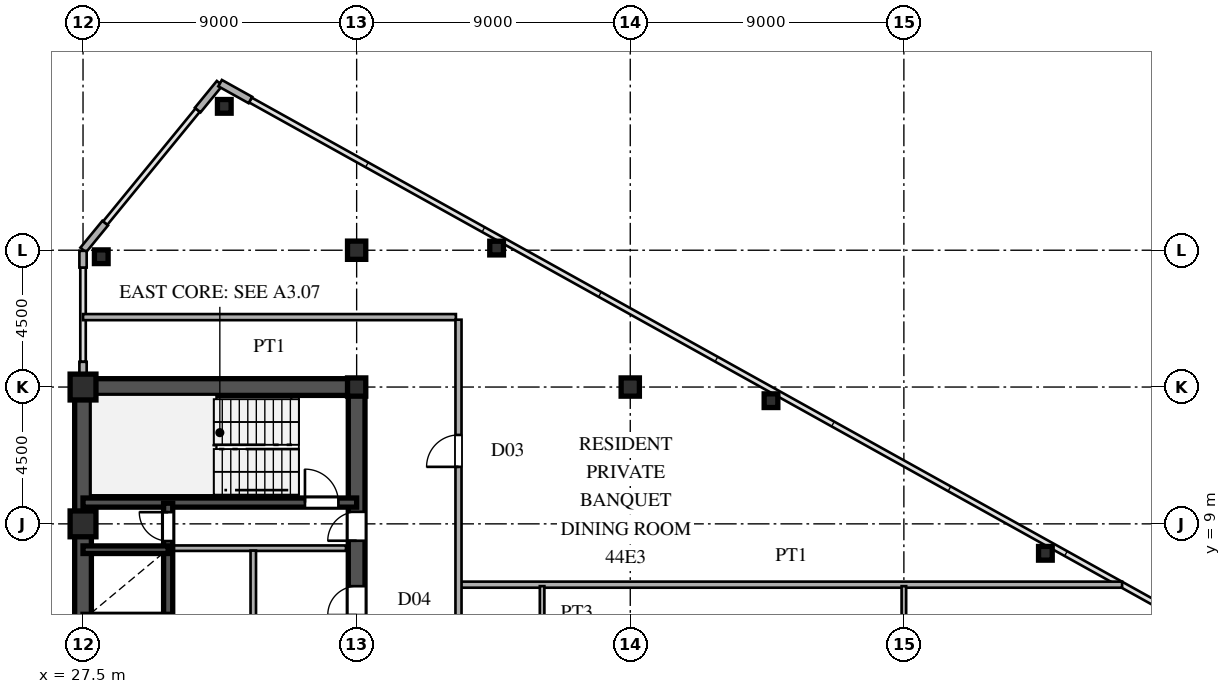
"""IFC4 building model, lengths in metres.
Left out: names, types, materials, properties, quantities, classifications, styles, units other than length and angle.
Written with IfcOpenShell. Run it as: python <this file> out.ifc"""

import sys

from ifc_helpers import new_model, si_unit, direction, frame, frame_2d, origin, origin_2d, place, context, subcontext, project, spatial, rectangle, hollow_rectangle, i_section, extrude, source, transform, mapped, element, fill, save


model = new_model("IFC4")
c1 = context("Model", 3, precision=1e-05, world=origin(), true_north=direction((0.0, 1.0)))
c2 = subcontext(c1, "Body", "Model", "MODEL_VIEW")
j1 = project(units=[si_unit("LENGTHUNIT", "METRE"), si_unit("PLANEANGLEUNIT", "RADIAN")], contexts=[c1])
p1 = place(None, origin())
s1 = spatial("IfcSite", under=j1, at=p1, CompositionType="ELEMENT")
p2 = place(p1, origin())
s2 = spatial("IfcBuilding", under=s1, at=p2, CompositionType="ELEMENT")
p3 = place(p2, frame((0.0, 0.0, 167.1)))
s3 = spatial("IfcBuildingStorey", under=s2, at=p3, CompositionType="ELEMENT", Elevation=167.1)
m1 = source(origin(), c2, "Body", "SweptSolid", [
    extrude(hollow_rectangle(XDim=0.85, YDim=0.85, WallThickness=0.036, at=origin_2d()), origin(), (0.0, 0.0, 1.0), 3.6),
])
for number, where, z_axis, x_axis in (
    (1, (27.5, 9.0, 0.0), (0.0, 0.0, 1.0), (1.0, 0.0, 0.0)),
    (2, (27.5, 13.5, 0.0), (0.0, 0.0, 1.0), (1.0, 0.0, 0.0)),
):
    element("IfcColumn", number, at=place(p3, frame(where, z_axis=z_axis, x_axis=x_axis)), inside=s3, PredefinedType="COLUMN", context=c2, shape_type="MappedRepresentation", body=[
        mapped(m1, transform((0.0, 0.0, 0.0), scale=1.0)),
    ])
m2 = source(origin(), c2, "Body", "SweptSolid", [
    extrude(i_section(OverallWidth=0.6, OverallDepth=0.6, WebThickness=0.025, FlangeThickness=0.04, at=origin_2d()), origin(), (0.0, 0.0, 1.0), 3.6),
])
for number, where, z_axis, x_axis in (
    (3, (36.5, 13.5, 0.0), (0.0, 0.0, 1.0), (1.0, 0.0, 0.0)),
    (4, (36.5, 18.0, 0.0), (0.0, 0.0, 1.0), (1.0, 0.0, 0.0)),
    (5, (45.5, 13.5, 0.0), (0.0, 0.0, 1.0), (1.0, 0.0, 0.0)),
):
    element("IfcColumn", number, at=place(p3, frame(where, z_axis=z_axis, x_axis=x_axis)), inside=s3, PredefinedType="COLUMN", context=c2, shape_type="MappedRepresentation", body=[
        mapped(m2, transform((0.0, 0.0, 0.0), scale=1.0)),
    ])
m3 = source(origin(), c2, "Body", "SweptSolid", [
    extrude(hollow_rectangle(XDim=0.45, YDim=0.45, WallThickness=0.018, at=origin_2d()), origin(), (0.0, 0.0, 1.0), 3.6),
])
for number, where, z_axis, x_axis in (
    (6, (32.147, 22.732, 0.0), (0.0, 0.0, 1.0), (1.0, 0.0, 0.0)),
    (7, (28.1, 17.786, 0.0), (0.0, 0.0, 1.0), (1.0, 0.0, 0.0)),
    (8, (41.104, 18.071, 0.0), (0.0, 0.0, 1.0), (1.0, 0.0, 0.0)),
    (9, (50.129, 13.051, 0.0), (0.0, 0.0, 1.0), (1.0, 0.0, 0.0)),
    (10, (59.155, 8.031, 0.0), (0.0, 0.0, 1.0), (1.0, 0.0, 0.0)),
):
    element("IfcColumn", number, at=place(p3, frame(where, z_axis=z_axis, x_axis=x_axis)), inside=s3, PredefinedType="COLUMN", context=c2, shape_type="MappedRepresentation", body=[
        mapped(m3, transform((0.0, 0.0, 0.0), scale=1.0)),
    ])
p4 = place(p3, frame((33.005, 22.941, 0.0), z_axis=(0.0, 0.0, 1.0), x_axis=(-0.87385402111, 0.486188389196, 0.0)))
e11 = element("IfcWall", 11, at=p4, inside=s3, PredefinedType="SOLIDWALL", context=c2, shape_type="SweptSolid", body=[
    extrude(rectangle(XDim=1.14, YDim=0.24, at=frame_2d((0.57, 0.0))), origin(), (0.0, 0.0, 1.0), 3.38),
])
for number, where, z_axis, x_axis in (
    (12, (31.994, 23.492, 0.0), (0.0, 0.0, 1.0), (-0.633, -0.774, 0.0)),
    (13, (28.228, 18.89, 0.0), (0.0, 0.0, 1.0), (-0.633, -0.774, 0.0)),
):
    element("IfcWall", number, at=place(p3, frame(where, z_axis=z_axis, x_axis=x_axis)), inside=s3, PredefinedType="SOLIDWALL", context=c2, shape_type="SweptSolid", body=[
        extrude(rectangle(XDim=1.14, YDim=0.24, at=frame_2d((0.57, 0.0))), origin(), (0.0, 0.0, 1.0), 3.38),
    ])
p5 = place(p3, frame((27.5, 13.78, 0.0), z_axis=(0.0, 0.0, 1.0), x_axis=(0.0, 1.0, 0.0)))
e14 = element("IfcWall", 14, at=p5, inside=s3, PredefinedType="SOLIDWALL", context=c2, shape_type="SweptSolid", body=[
    extrude(rectangle(XDim=0.55, YDim=0.24, at=frame_2d((0.275, 0.0))), origin(), (0.0, 0.0, 1.0), 2.88),
])
p6 = place(p3, frame((27.5, 17.43, 0.0), z_axis=(0.0, 0.0, 1.0), x_axis=(0.0, 1.0, 0.0)))
e15 = element("IfcWall", 15, at=p6, inside=s3, PredefinedType="SOLIDWALL", context=c2, shape_type="SweptSolid", body=[
    extrude(rectangle(XDim=0.55, YDim=0.24, at=frame_2d((0.275, 0.0))), origin(), (0.0, 0.0, 1.0), 3.38),
])
p7 = place(p3, frame((27.5, 1.3, 0.0), z_axis=(0.0, 0.0, 1.0), x_axis=(0.0, 1.0, 0.0)))
e16 = element("IfcWall", 16, at=p7, inside=s3, PredefinedType="SHEAR", context=c2, shape_type="SweptSolid", body=[
    extrude(rectangle(XDim=12.2, YDim=0.55, at=frame_2d((6.1, 0.0))), origin(), (0.0, 0.0, 1.0), 3.38),
])
p8 = place(p3, frame((27.5, 13.5, 0.0), z_axis=(0.0, 0.0, 1.0), x_axis=(1.0, 0.0, 0.0)))
e17 = element("IfcWall", 17, at=p8, inside=s3, PredefinedType="SHEAR", context=c2, shape_type="SweptSolid", body=[
    extrude(rectangle(XDim=9.0, YDim=0.55, at=frame_2d((4.5, 0.0))), origin(), (0.0, 0.0, 1.0), 3.38),
])
p9 = place(p3, frame((36.5, 8.2, 0.0), z_axis=(0.0, 0.0, 1.0), x_axis=(0.0, 1.0, 0.0)))
e18 = element("IfcWall", 18, at=p9, inside=s3, PredefinedType="SHEAR", context=c2, shape_type="SweptSolid", body=[
    extrude(rectangle(XDim=5.45, YDim=0.55, at=frame_2d((2.725, 0.0))), origin(), (0.0, 0.0, 1.0), 3.38),
])
p10 = place(p9, frame((0.245, 0.0, 0.0)))
e19 = element("IfcOpeningElement", 19, at=p10, cuts=e18, PredefinedType="OPENING", context=c2, shape_type="SweptSolid", body=[
    extrude(rectangle(XDim=0.95, YDim=2.15, at=frame_2d((0.475, 1.075))), frame((0.0, 0.285, 0.0), z_axis=(0.0, -1.0, 0.0), x_axis=(1.0, 0.0, 0.0)), (0.0, 0.0, 1.0), 0.57),
])
p11 = place(p3, frame((36.5, 4.75, 0.0), z_axis=(0.0, 0.0, 1.0), x_axis=(0.0, 1.0, 0.0)))
e20 = element("IfcWall", 20, at=p11, inside=s3, PredefinedType="SHEAR", context=c2, shape_type="SweptSolid", body=[
    extrude(rectangle(XDim=3.45, YDim=0.55, at=frame_2d((1.725, 0.0))), origin(), (0.0, 0.0, 1.0), 3.38),
])
p12 = place(p11, frame((1.25, 0.0, 0.0)))
e21 = element("IfcOpeningElement", 21, at=p12, cuts=e20, PredefinedType="OPENING", context=c2, shape_type="SweptSolid", body=[
    extrude(rectangle(XDim=0.95, YDim=2.15, at=frame_2d((0.475, 1.075))), frame((0.0, 0.285, 0.0), z_axis=(0.0, -1.0, 0.0), x_axis=(1.0, 0.0, 0.0)), (0.0, 0.0, 1.0), 0.57),
])
p13 = place(p3, frame((27.5, 9.7, 0.0), z_axis=(0.0, 0.0, 1.0), x_axis=(1.0, 0.0, 0.0)))
e22 = element("IfcWall", 22, at=p13, inside=s3, PredefinedType="SHEAR", context=c2, shape_type="SweptSolid", body=[
    extrude(rectangle(XDim=9.0, YDim=0.3, at=frame_2d((4.5, 0.0))), origin(), (0.0, 0.0, 1.0), 3.38),
])
p14 = place(p13, frame((7.3, 0.0, 0.0)))
e23 = element("IfcOpeningElement", 23, at=p14, cuts=e22, PredefinedType="OPENING", context=c2, shape_type="SweptSolid", body=[
    extrude(rectangle(XDim=1.1, YDim=2.2, at=frame_2d((0.55, 1.1))), frame((0.0, 0.16, 0.0), z_axis=(0.0, -1.0, 0.0), x_axis=(1.0, 0.0, 0.0)), (0.0, 0.0, 1.0), 0.32),
])
for number, where, z_axis, x_axis in (
    (24, (27.5, 5.9, 0.0), (0.0, 0.0, 1.0), (1.0, 0.0, 0.0)),
    (25, (27.5, 8.15, 0.0), (0.0, 0.0, 1.0), (1.0, 0.0, 0.0)),
):
    element("IfcWall", number, at=place(p3, frame(where, z_axis=z_axis, x_axis=x_axis)), inside=s3, PredefinedType="SHEAR", context=c2, shape_type="SweptSolid", body=[
        extrude(rectangle(XDim=2.8, YDim=0.25, at=frame_2d((1.4, 0.0))), origin(), (0.0, 0.0, 1.0), 3.38),
    ])
p15 = place(p3, frame((30.3, 5.9, 0.0), z_axis=(0.0, 0.0, 1.0), x_axis=(0.0, 1.0, 0.0)))
e26 = element("IfcWall", 26, at=p15, inside=s3, PredefinedType="SHEAR", context=c2, shape_type="SweptSolid", body=[
    extrude(rectangle(XDim=2.25, YDim=0.3, at=frame_2d((1.125, 0.0))), origin(), (0.0, 0.0, 1.0), 3.38),
])
p16 = place(p3, frame((30.3, 8.15, 0.0), z_axis=(0.0, 0.0, 1.0), x_axis=(0.0, 1.0, 0.0)))
e27 = element("IfcWall", 27, at=p16, inside=s3, PredefinedType="SHEAR", context=c2, shape_type="SweptSolid", body=[
    extrude(rectangle(XDim=1.53, YDim=0.3, at=frame_2d((0.765, 0.0))), origin(), (0.0, 0.0, 1.0), 3.38),
])
p17 = place(p16, frame((0.285, 0.0, 0.0)))
e28 = element("IfcOpeningElement", 28, at=p17, cuts=e27, PredefinedType="OPENING", context=c2, shape_type="SweptSolid", body=[
    extrude(rectangle(XDim=0.95, YDim=2.15, at=frame_2d((0.475, 1.075))), frame((0.0, 0.16, 0.0), z_axis=(0.0, -1.0, 0.0), x_axis=(1.0, 0.0, 0.0)), (0.0, 0.0, 1.0), 0.32),
])
p18 = place(p3, frame((30.45, 8.2, 0.0), z_axis=(0.0, 0.0, 1.0), x_axis=(1.0, 0.0, 0.0)))
e29 = element("IfcWall", 29, at=p18, inside=s3, PredefinedType="PARTITIONING", context=c2, shape_type="SweptSolid", body=[
    extrude(rectangle(XDim=5.7, YDim=0.18, at=frame_2d((2.85, 0.0))), origin(), (0.0, 0.0, 1.0), 3.38),
])
p19 = place(p3, frame((33.1, 1.38, 0.0), z_axis=(0.0, 0.0, 1.0), x_axis=(0.0, 1.0, 0.0)))
e30 = element("IfcWall", 30, at=p19, inside=s3, PredefinedType="PARTITIONING", context=c2, shape_type="SweptSolid", body=[
    extrude(rectangle(XDim=6.74, YDim=0.18, at=frame_2d((3.37, 0.0))), origin(), (0.0, 0.0, 1.0), 3.38),
])
p20 = place(p3, frame((39.93, 7.0, 0.0), z_axis=(0.0, 0.0, 1.0), x_axis=(1.0, 0.0, 0.0)))
e31 = element("IfcWall", 31, at=p20, inside=s3, PredefinedType="PARTITIONING", context=c2, shape_type="SweptSolid", body=[
    extrude(rectangle(XDim=21.748, YDim=0.2, at=frame_2d((10.874, 0.0))), origin(), (0.0, 0.0, 1.0), 3.38),
])
p21 = place(p3, frame((27.5, 15.8, 0.0), z_axis=(0.0, 0.0, 1.0), x_axis=(1.0, 0.0, 0.0)))
e32 = element("IfcWall", 32, at=p21, inside=s3, PredefinedType="PARTITIONING", context=c2, shape_type="SweptSolid", body=[
    extrude(rectangle(XDim=12.265, YDim=0.2, at=frame_2d((6.132, 0.0))), origin(), (0.0, 0.0, 1.0), 3.38),
])
p22 = place(p3, frame((39.85, -15.715, 0.0), z_axis=(0.0, 0.0, 1.0), x_axis=(0.0, 1.0, 0.0)))
e33 = element("IfcWall", 33, at=p22, inside=s3, PredefinedType="PARTITIONING", context=c2, shape_type="SweptSolid", body=[
    extrude(rectangle(XDim=31.43, YDim=0.2, at=frame_2d((15.715, 0.0))), origin(), (0.0, 0.0, 1.0), 3.38),
])
p23 = place(p22, frame((6.792, 0.0, 0.0)))
e34 = element("IfcOpeningElement", 34, at=p23, cuts=e33, PredefinedType="OPENING", context=c2, shape_type="SweptSolid", body=[
    extrude(rectangle(XDim=1.05, YDim=2.25, at=frame_2d((0.525, 1.125))), frame((0.0, 0.11, 0.0), z_axis=(0.0, -1.0, 0.0), x_axis=(1.0, 0.0, 0.0)), (0.0, 0.0, 1.0), 0.22),
])
p24 = place(p22, frame((14.98, 0.0, 0.0)))
e35 = element("IfcOpeningElement", 35, at=p24, cuts=e33, PredefinedType="OPENING", context=c2, shape_type="SweptSolid", body=[
    extrude(rectangle(XDim=1.05, YDim=2.25, at=frame_2d((0.525, 1.125))), frame((0.0, 0.11, 0.0), z_axis=(0.0, -1.0, 0.0), x_axis=(1.0, 0.0, 0.0)), (0.0, 0.0, 1.0), 0.22),
])
p25 = place(p22, frame((26.59, 0.0, 0.0)))
e36 = element("IfcOpeningElement", 36, at=p25, cuts=e33, PredefinedType="OPENING", context=c2, shape_type="SweptSolid", body=[
    extrude(rectangle(XDim=1.05, YDim=2.25, at=frame_2d((0.525, 1.125))), frame((0.0, 0.11, 0.0), z_axis=(0.0, -1.0, 0.0), x_axis=(1.0, 0.0, 0.0)), (0.0, 0.0, 1.0), 0.22),
])
p26 = place(p3, frame((42.6, 2.852, 0.0), z_axis=(0.0, 0.0, 1.0), x_axis=(0.0, 1.0, 0.0)))
e37 = element("IfcWall", 37, at=p26, inside=s3, PredefinedType="PARTITIONING", context=c2, shape_type="SweptSolid", body=[
    extrude(rectangle(XDim=4.098, YDim=0.15, at=frame_2d((2.049, 0.0))), origin(), (0.0, 0.0, 1.0), 3.38),
])
p27 = place(p3, frame((54.5, -10.485, 0.0), z_axis=(0.0, 0.0, 1.0), x_axis=(0.0, 1.0, 0.0)))
e38 = element("IfcWall", 38, at=p27, inside=s3, PredefinedType="PARTITIONING", context=c2, shape_type="SweptSolid", body=[
    extrude(rectangle(XDim=17.435, YDim=0.15, at=frame_2d((8.718, 0.0))), origin(), (0.0, 0.0, 1.0), 2.78),
])
p28 = place(p27, frame((1.242, 0.0, 0.0)))
e39 = element("IfcOpeningElement", 39, at=p28, cuts=e38, PredefinedType="OPENING", context=c2, shape_type="SweptSolid", body=[
    extrude(rectangle(XDim=0.95, YDim=2.15, at=frame_2d((0.475, 1.075))), frame((0.0, 0.085, 0.0), z_axis=(0.0, -1.0, 0.0), x_axis=(1.0, 0.0, 0.0)), (0.0, 0.0, 1.0), 0.17),
])
p29 = place(p27, frame((10.01, 0.0, 0.0)))
e40 = element("IfcOpeningElement", 40, at=p29, cuts=e38, PredefinedType="OPENING", context=c2, shape_type="SweptSolid", body=[
    extrude(rectangle(XDim=0.95, YDim=2.15, at=frame_2d((0.475, 1.075))), frame((0.0, 0.085, 0.0), z_axis=(0.0, -1.0, 0.0), x_axis=(1.0, 0.0, 0.0)), (0.0, 0.0, 1.0), 0.17),
])
m4 = source(origin(), c2, "Body", "SweptSolid", [
    extrude(rectangle(XDim=0.95, YDim=2.15, at=frame_2d((0.475, 1.075))), frame((0.0, 0.025, 0.0), z_axis=(0.0, -1.0, 0.0), x_axis=(1.0, 0.0, 0.0)), (0.0, 0.0, 1.0), 0.05),
])
p30 = place(p10, origin())
e41 = element("IfcDoor", 41, at=p30, inside=s3, OperationType="SINGLE_SWING_LEFT", PredefinedType="DOOR", context=c2, shape_type="MappedRepresentation", body=[
    mapped(m4, transform((0.0, 0.0, 0.0), scale=1.0)),
])
fill(e19, e41)
p31 = place(p12, origin())
e42 = element("IfcDoor", 42, at=p31, inside=s3, OperationType="SINGLE_SWING_LEFT", PredefinedType="DOOR", context=c2, shape_type="MappedRepresentation", body=[
    mapped(m4, transform((0.0, 0.0, 0.0), scale=1.0)),
])
fill(e21, e42)
m5 = source(origin(), c2, "Body", "SweptSolid", [
    extrude(rectangle(XDim=1.1, YDim=2.2, at=frame_2d((0.55, 1.1))), frame((0.0, 0.025, 0.0), z_axis=(0.0, -1.0, 0.0), x_axis=(1.0, 0.0, 0.0)), (0.0, 0.0, 1.0), 0.05),
])
p32 = place(p14, origin())
e43 = element("IfcDoor", 43, at=p32, inside=s3, OperationType="SINGLE_SWING_LEFT", PredefinedType="DOOR", context=c2, shape_type="MappedRepresentation", body=[
    mapped(m5, transform((0.0, 0.0, 0.0), scale=1.0)),
])
fill(e23, e43)
p33 = place(p17, origin())
e44 = element("IfcDoor", 44, at=p33, inside=s3, OperationType="SINGLE_SWING_RIGHT", PredefinedType="DOOR", context=c2, shape_type="MappedRepresentation", body=[
    mapped(m4, transform((0.0, 0.0, 0.0), scale=1.0)),
])
fill(e28, e44)
m6 = source(origin(), c2, "Body", "SweptSolid", [
    extrude(rectangle(XDim=1.05, YDim=2.25, at=frame_2d((0.525, 1.125))), frame((0.0, 0.025, 0.0), z_axis=(0.0, -1.0, 0.0), x_axis=(1.0, 0.0, 0.0)), (0.0, 0.0, 1.0), 0.05),
])
p34 = place(p25, origin())
e45 = element("IfcDoor", 45, at=p34, inside=s3, OperationType="SINGLE_SWING_LEFT", PredefinedType="DOOR", context=c2, shape_type="MappedRepresentation", body=[
    mapped(m6, transform((0.0, 0.0, 0.0), scale=1.0)),
])
fill(e36, e45)
save(model, sys.argv[1])
